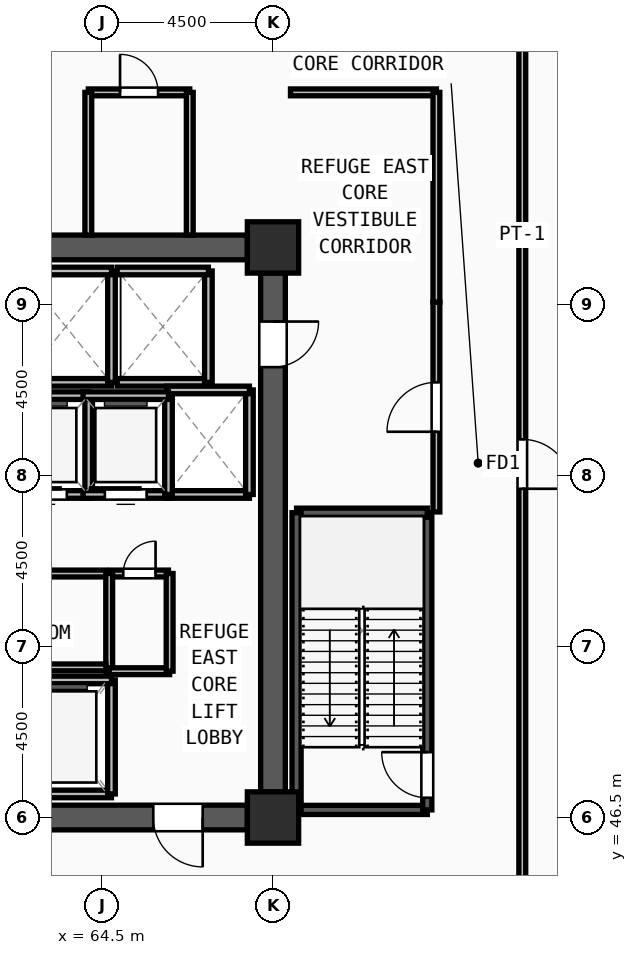
"""IFC4 building model, lengths in metres.
Left out: names, types, materials, properties, quantities, classifications, styles, units other than length and angle.
Written with IfcOpenShell. Run it as: python <this file> out.ifc"""

import sys

from ifc_helpers import new_model, si_unit, direction, frame, frame_2d, origin, origin_2d, place, context, subcontext, project, spatial, rectangle, extrude, source, transform, mapped, element, fill, save


model = new_model("IFC4")
c1 = context("Model", 3, precision=1e-05, world=origin(), true_north=direction((0.0, 1.0)))
c2 = subcontext(c1, "Body", "Model", "MODEL_VIEW")
j1 = project(units=[si_unit("LENGTHUNIT", "METRE"), si_unit("PLANEANGLEUNIT", "RADIAN")], contexts=[c1])
p1 = place(None, origin())
s1 = spatial("IfcSite", under=j1, at=p1, CompositionType="ELEMENT")
p2 = place(p1, origin())
s2 = spatial("IfcBuilding", under=s1, at=p2, CompositionType="ELEMENT")
p3 = place(p2, frame((0.0, 0.0, 277.5)))
s3 = spatial("IfcBuildingStorey", under=s2, at=p3, CompositionType="ELEMENT", Elevation=277.5)
m1 = source(origin(), c2, "Body", "SweptSolid", [
    extrude(rectangle(XDim=1.35, YDim=1.35, at=origin_2d()), origin(), (0.0, 0.0, 1.0), 4.5),
])
for number, where, z_axis, x_axis in (
    (1, (69.0, 46.5, 0.0), (0.0, 0.0, 1.0), (1.0, 0.0, 0.0)),
    (2, (69.0, 61.5, 0.0), (0.0, 0.0, 1.0), (1.0, 0.0, 0.0)),
):
    element("IfcColumn", number, at=place(p3, frame(where, z_axis=z_axis, x_axis=x_axis)), inside=s3, PredefinedType="COLUMN", context=c2, shape_type="MappedRepresentation", body=[
        mapped(m1, transform((0.0, 0.0, 0.0), x_axis=(1.0, 0.0, 0.0), y_axis=(0.0, 1.0, 0.0), z_axis=(0.0, 0.0, 1.0), scale=1.0)),
    ])
p4 = place(p3, frame((60.675, 61.5, 0.0), z_axis=(0.0, 0.0, 1.0), x_axis=(1.0, 0.0, 0.0)))
e3 = element("IfcWall", 3, at=p4, inside=s3, PredefinedType="SHEAR", context=c2, shape_type="SweptSolid", body=[
    extrude(rectangle(XDim=7.65, YDim=0.65, at=frame_2d((3.825, 0.0))), origin(), (0.0, 0.0, 1.0), 4.22),
])
p5 = place(p3, frame((69.0, 60.825, 0.0), z_axis=(0.0, 0.0, 1.0), x_axis=(0.0, -1.0, 0.0)))
e4 = element("IfcWall", 4, at=p5, inside=s3, PredefinedType="SHEAR", context=c2, shape_type="SweptSolid", body=[
    extrude(rectangle(XDim=13.65, YDim=0.65, at=frame_2d((6.825, 0.0))), origin(), (0.0, 0.0, 1.0), 4.22),
])
m2 = source(origin(), c2, "Body", "SweptSolid", [
    extrude(rectangle(XDim=1.2, YDim=2.2, at=frame_2d((0.6, 1.1))), frame((0.0, 0.335, 0.0), z_axis=(0.0, -1.0, 0.0), x_axis=(1.0, 0.0, 0.0)), (0.0, 0.0, 1.0), 0.67),
])
p6 = place(p5, frame((1.275, 0.0, 0.0)))
e5 = element("IfcOpeningElement", 5, at=p6, cuts=e4, PredefinedType="OPENING", context=c2, shape_type="MappedRepresentation", body=[
    mapped(m2, transform((0.0, 0.0, 0.0), x_axis=(1.0, 0.0, 0.0), y_axis=(0.0, 1.0, 0.0), z_axis=(0.0, 0.0, 1.0), scale=1.0)),
])
p7 = place(p3, frame((68.325, 46.5, 0.0), z_axis=(0.0, 0.0, 1.0), x_axis=(-1.0, 0.0, 0.0)))
e6 = element("IfcWall", 6, at=p7, inside=s3, PredefinedType="SHEAR", context=c2, shape_type="SweptSolid", body=[
    extrude(rectangle(XDim=7.65, YDim=0.65, at=frame_2d((3.825, 0.0))), origin(), (0.0, 0.0, 1.0), 4.22),
])
m3 = source(origin(), c2, "Body", "SweptSolid", [
    extrude(rectangle(XDim=1.3, YDim=2.2, at=frame_2d((0.65, 1.1))), frame((0.0, 0.335, 0.0), z_axis=(0.0, -1.0, 0.0), x_axis=(1.0, 0.0, 0.0)), (0.0, 0.0, 1.0), 0.67),
])
p8 = place(p7, frame((1.175, 0.0, 0.0)))
e7 = element("IfcOpeningElement", 7, at=p8, cuts=e6, PredefinedType="OPENING", context=c2, shape_type="MappedRepresentation", body=[
    mapped(m3, transform((0.0, 0.0, 0.0), x_axis=(1.0, 0.0, 0.0), y_axis=(0.0, 1.0, 0.0), z_axis=(0.0, 0.0, 1.0), scale=1.0)),
])
p9 = place(p3, frame((69.62, 46.7, 0.0), z_axis=(0.0, 0.0, 1.0), x_axis=(1.0, 0.0, 0.0)))
e8 = element("IfcWall", 8, at=p9, inside=s3, PredefinedType="SOLIDWALL", context=c2, shape_type="SweptSolid", body=[
    extrude(rectangle(XDim=3.44, YDim=0.24, at=frame_2d((1.72, 0.0))), origin(), (0.0, 0.0, 1.0), 4.22),
])
p10 = place(p3, frame((73.06, 46.7, 0.0), z_axis=(0.0, 0.0, 1.0), x_axis=(0.0, 1.0, 0.0)))
e9 = element("IfcWall", 9, at=p10, inside=s3, PredefinedType="SOLIDWALL", context=c2, shape_type="SweptSolid", body=[
    extrude(rectangle(XDim=7.82, YDim=0.24, at=frame_2d((3.91, 0.0))), origin(), (0.0, 0.0, 1.0), 4.22),
])
m4 = source(origin(), c2, "Body", "SweptSolid", [
    extrude(rectangle(XDim=1.2, YDim=2.2, at=frame_2d((0.6, 1.1))), frame((0.0, 0.13, 0.0), z_axis=(0.0, -1.0, 0.0), x_axis=(1.0, 0.0, 0.0)), (0.0, 0.0, 1.0), 0.26),
])
p11 = place(p10, frame((0.32, 0.0, 0.0)))
e10 = element("IfcOpeningElement", 10, at=p11, cuts=e9, PredefinedType="OPENING", context=c2, shape_type="MappedRepresentation", body=[
    mapped(m4, transform((0.0, 0.0, 0.0), x_axis=(1.0, 0.0, 0.0), y_axis=(0.0, 1.0, 0.0), z_axis=(0.0, 0.0, 1.0), scale=1.0)),
])
p12 = place(p3, frame((73.06, 54.52, 0.0), z_axis=(0.0, 0.0, 1.0), x_axis=(-1.0, 0.0, 0.0)))
e11 = element("IfcWall", 11, at=p12, inside=s3, PredefinedType="SOLIDWALL", context=c2, shape_type="SweptSolid", body=[
    extrude(rectangle(XDim=3.44, YDim=0.24, at=frame_2d((1.72, 0.0))), origin(), (0.0, 0.0, 1.0), 4.22),
])
p13 = place(p3, frame((69.62, 54.52, 0.0), z_axis=(0.0, 0.0, 1.0), x_axis=(0.0, -1.0, 0.0)))
e12 = element("IfcWall", 12, at=p13, inside=s3, PredefinedType="SOLIDWALL", context=c2, shape_type="SweptSolid", body=[
    extrude(rectangle(XDim=7.82, YDim=0.24, at=frame_2d((3.91, 0.0))), origin(), (0.0, 0.0, 1.0), 4.22),
])
p14 = place(p3, frame((62.35, 47.12, 0.0), z_axis=(0.0, 0.0, 1.0), x_axis=(1.0, 0.0, 0.0)))
e13 = element("IfcWall", 13, at=p14, inside=s3, PredefinedType="SOLIDWALL", context=c2, shape_type="SweptSolid", body=[
    extrude(rectangle(XDim=2.4, YDim=0.2, at=frame_2d((1.2, 0.0))), origin(), (0.0, 0.0, 1.0), 4.22),
])
p15 = place(p3, frame((64.75, 47.12, 0.0), z_axis=(0.0, 0.0, 1.0), x_axis=(0.0, 1.0, 0.0)))
e14 = element("IfcWall", 14, at=p15, inside=s3, PredefinedType="SOLIDWALL", context=c2, shape_type="SweptSolid", body=[
    extrude(rectangle(XDim=3.0, YDim=0.2, at=frame_2d((1.5, 0.0))), origin(), (0.0, 0.0, 1.0), 4.22),
])
for number, where, z_axis, x_axis in (
    (15, (64.75, 50.12, 0.0), (0.0, 0.0, 1.0), (-1.0, 0.0, 0.0)),
    (16, (62.35, 57.95, 0.0), (0.0, 0.0, 1.0), (1.0, 0.0, 0.0)),
):
    element("IfcWall", number, at=place(p3, frame(where, z_axis=z_axis, x_axis=x_axis)), inside=s3, PredefinedType="SOLIDWALL", context=c2, shape_type="SweptSolid", body=[
        extrude(rectangle(XDim=2.4, YDim=0.2, at=frame_2d((1.2, 0.0))), origin(), (0.0, 0.0, 1.0), 4.22),
    ])
p16 = place(p3, frame((64.75, 57.95, 0.0), z_axis=(0.0, 0.0, 1.0), x_axis=(0.0, 1.0, 0.0)))
e17 = element("IfcWall", 17, at=p16, inside=s3, PredefinedType="SOLIDWALL", context=c2, shape_type="SweptSolid", body=[
    extrude(rectangle(XDim=2.93, YDim=0.2, at=frame_2d((1.465, 0.0))), origin(), (0.0, 0.0, 1.0), 4.22),
])
p17 = place(p3, frame((64.75, 60.88, 0.0), z_axis=(0.0, 0.0, 1.0), x_axis=(-1.0, 0.0, 0.0)))
e18 = element("IfcWall", 18, at=p17, inside=s3, PredefinedType="SOLIDWALL", context=c2, shape_type="SweptSolid", body=[
    extrude(rectangle(XDim=2.4, YDim=0.2, at=frame_2d((1.2, 0.0))), origin(), (0.0, 0.0, 1.0), 4.22),
])
p18 = place(p3, frame((64.9, 57.95, 0.0), z_axis=(0.0, 0.0, 1.0), x_axis=(1.0, 0.0, 0.0)))
e19 = element("IfcWall", 19, at=p18, inside=s3, PredefinedType="SOLIDWALL", context=c2, shape_type="SweptSolid", body=[
    extrude(rectangle(XDim=2.4, YDim=0.2, at=frame_2d((1.2, 0.0))), origin(), (0.0, 0.0, 1.0), 4.22),
])
p19 = place(p3, frame((67.3, 57.95, 0.0), z_axis=(0.0, 0.0, 1.0), x_axis=(0.0, 1.0, 0.0)))
e20 = element("IfcWall", 20, at=p19, inside=s3, PredefinedType="SOLIDWALL", context=c2, shape_type="SweptSolid", body=[
    extrude(rectangle(XDim=2.93, YDim=0.2, at=frame_2d((1.465, 0.0))), origin(), (0.0, 0.0, 1.0), 4.22),
])
p20 = place(p3, frame((67.3, 60.88, 0.0), z_axis=(0.0, 0.0, 1.0), x_axis=(-1.0, 0.0, 0.0)))
e21 = element("IfcWall", 21, at=p20, inside=s3, PredefinedType="SOLIDWALL", context=c2, shape_type="SweptSolid", body=[
    extrude(rectangle(XDim=2.4, YDim=0.2, at=frame_2d((1.2, 0.0))), origin(), (0.0, 0.0, 1.0), 4.22),
])
p21 = place(p3, frame((66.2, 55.0, 0.0), z_axis=(0.0, 0.0, 1.0), x_axis=(1.0, 0.0, 0.0)))
e22 = element("IfcWall", 22, at=p21, inside=s3, PredefinedType="SOLIDWALL", context=c2, shape_type="SweptSolid", body=[
    extrude(rectangle(XDim=2.18, YDim=0.2, at=frame_2d((1.09, 0.0))), origin(), (0.0, 0.0, 1.0), 4.22),
])
p22 = place(p3, frame((68.38, 55.0, 0.0), z_axis=(0.0, 0.0, 1.0), x_axis=(0.0, 1.0, 0.0)))
e23 = element("IfcWall", 23, at=p22, inside=s3, PredefinedType="SOLIDWALL", context=c2, shape_type="SweptSolid", body=[
    extrude(rectangle(XDim=2.75, YDim=0.2, at=frame_2d((1.375, 0.0))), origin(), (0.0, 0.0, 1.0), 4.22),
])
p23 = place(p3, frame((68.38, 57.75, 0.0), z_axis=(0.0, 0.0, 1.0), x_axis=(-1.0, 0.0, 0.0)))
e24 = element("IfcWall", 24, at=p23, inside=s3, PredefinedType="SOLIDWALL", context=c2, shape_type="SweptSolid", body=[
    extrude(rectangle(XDim=2.18, YDim=0.2, at=frame_2d((1.09, 0.0))), origin(), (0.0, 0.0, 1.0), 4.22),
])
p24 = place(p3, frame((61.9, 55.0, 0.0), z_axis=(0.0, 0.0, 1.0), x_axis=(1.0, 0.0, 0.0)))
e25 = element("IfcWall", 25, at=p24, inside=s3, PredefinedType="SOLIDWALL", context=c2, shape_type="SweptSolid", body=[
    extrude(rectangle(XDim=2.25, YDim=0.2, at=frame_2d((1.125, 0.0))), origin(), (0.0, 0.0, 1.0), 4.22),
])
m5 = source(origin(), c2, "Body", "SweptSolid", [
    extrude(rectangle(XDim=1.1, YDim=2.2, at=frame_2d((0.55, 1.1))), frame((0.0, 0.11, 0.0), z_axis=(0.0, -1.0, 0.0), x_axis=(1.0, 0.0, 0.0)), (0.0, 0.0, 1.0), 0.22),
])
p25 = place(p24, frame((0.575, 0.0, 0.0)))
e26 = element("IfcOpeningElement", 26, at=p25, cuts=e25, PredefinedType="OPENING", context=c2, shape_type="MappedRepresentation", body=[
    mapped(m5, transform((0.0, 0.0, 0.0), x_axis=(1.0, 0.0, 0.0), y_axis=(0.0, 1.0, 0.0), z_axis=(0.0, 0.0, 1.0), scale=1.0)),
])
p26 = place(p3, frame((64.15, 55.0, 0.0), z_axis=(0.0, 0.0, 1.0), x_axis=(0.0, 1.0, 0.0)))
e27 = element("IfcWall", 27, at=p26, inside=s3, PredefinedType="SOLIDWALL", context=c2, shape_type="SweptSolid", body=[
    extrude(rectangle(XDim=2.6, YDim=0.2, at=frame_2d((1.3, 0.0))), origin(), (0.0, 0.0, 1.0), 4.22),
])
p27 = place(p3, frame((64.15, 57.6, 0.0), z_axis=(0.0, 0.0, 1.0), x_axis=(-1.0, 0.0, 0.0)))
e28 = element("IfcWall", 28, at=p27, inside=s3, PredefinedType="SOLIDWALL", context=c2, shape_type="SweptSolid", body=[
    extrude(rectangle(XDim=2.25, YDim=0.2, at=frame_2d((1.125, 0.0))), origin(), (0.0, 0.0, 1.0), 4.22),
])
p28 = place(p3, frame((64.0, 55.0, 0.0), z_axis=(0.0, 0.0, 1.0), x_axis=(1.0, 0.0, 0.0)))
e29 = element("IfcWall", 29, at=p28, inside=s3, PredefinedType="SOLIDWALL", context=c2, shape_type="SweptSolid", body=[
    extrude(rectangle(XDim=2.25, YDim=0.2, at=frame_2d((1.125, 0.0))), origin(), (0.0, 0.0, 1.0), 4.22),
])
p29 = place(p28, frame((0.575, 0.0, 0.0)))
e30 = element("IfcOpeningElement", 30, at=p29, cuts=e29, PredefinedType="OPENING", context=c2, shape_type="MappedRepresentation", body=[
    mapped(m5, transform((0.0, 0.0, 0.0), x_axis=(1.0, 0.0, 0.0), y_axis=(0.0, 1.0, 0.0), z_axis=(0.0, 0.0, 1.0), scale=1.0)),
])
p30 = place(p3, frame((66.25, 55.0, 0.0), z_axis=(0.0, 0.0, 1.0), x_axis=(0.0, 1.0, 0.0)))
e31 = element("IfcWall", 31, at=p30, inside=s3, PredefinedType="SOLIDWALL", context=c2, shape_type="SweptSolid", body=[
    extrude(rectangle(XDim=2.6, YDim=0.2, at=frame_2d((1.3, 0.0))), origin(), (0.0, 0.0, 1.0), 4.22),
])
p31 = place(p3, frame((66.25, 57.6, 0.0), z_axis=(0.0, 0.0, 1.0), x_axis=(-1.0, 0.0, 0.0)))
e32 = element("IfcWall", 32, at=p31, inside=s3, PredefinedType="SOLIDWALL", context=c2, shape_type="SweptSolid", body=[
    extrude(rectangle(XDim=2.25, YDim=0.2, at=frame_2d((1.125, 0.0))), origin(), (0.0, 0.0, 1.0), 4.22),
])
p32 = place(p3, frame((55.39, 52.92, 0.0), z_axis=(0.0, 0.0, 1.0), x_axis=(1.0, 0.0, 0.0)))
e33 = element("IfcWall", 33, at=p32, inside=s3, PredefinedType="PARTITIONING", context=c2, shape_type="SweptSolid", body=[
    extrude(rectangle(XDim=9.21, YDim=0.18, at=frame_2d((4.605, 0.0))), origin(), (0.0, 0.0, 1.0), 4.22),
])
m6 = source(origin(), c2, "Body", "SweptSolid", [
    extrude(rectangle(XDim=0.85, YDim=2.1, at=frame_2d((0.425, 1.05))), frame((0.0, 0.1, 0.0), z_axis=(0.0, -1.0, 0.0), x_axis=(1.0, 0.0, 0.0)), (0.0, 0.0, 1.0), 0.2),
])
p33 = place(p32, frame((4.185, 0.0, 0.0)))
e34 = element("IfcOpeningElement", 34, at=p33, cuts=e33, PredefinedType="OPENING", context=c2, shape_type="MappedRepresentation", body=[
    mapped(m6, transform((0.0, 0.0, 0.0), x_axis=(1.0, 0.0, 0.0), y_axis=(0.0, 1.0, 0.0), z_axis=(0.0, 0.0, 1.0), scale=1.0)),
])
p34 = place(p3, frame((64.72, 52.92, 0.0), z_axis=(0.0, 0.0, 1.0), x_axis=(1.0, 0.0, 0.0)))
e35 = element("IfcWall", 35, at=p34, inside=s3, PredefinedType="PARTITIONING", context=c2, shape_type="SweptSolid", body=[
    extrude(rectangle(XDim=1.53, YDim=0.18, at=frame_2d((0.765, 0.0))), origin(), (0.0, 0.0, 1.0), 4.22),
])
p35 = place(p34, frame((0.34, 0.0, 0.0)))
e36 = element("IfcOpeningElement", 36, at=p35, cuts=e35, PredefinedType="OPENING", context=c2, shape_type="MappedRepresentation", body=[
    mapped(m6, transform((0.0, 0.0, 0.0), x_axis=(1.0, 0.0, 0.0), y_axis=(0.0, 1.0, 0.0), z_axis=(0.0, 0.0, 1.0), scale=1.0)),
])
p36 = place(p3, frame((64.14, 65.58, 0.0), z_axis=(0.0, 0.0, 1.0), x_axis=(1.0, 0.0, 0.0)))
e37 = element("IfcWall", 37, at=p36, inside=s3, PredefinedType="PARTITIONING", context=c2, shape_type="SweptSolid", body=[
    extrude(rectangle(XDim=2.67, YDim=0.18, at=frame_2d((1.335, 0.0))), origin(), (0.0, 0.0, 1.0), 4.22),
])
m7 = source(origin(), c2, "Body", "SweptSolid", [
    extrude(rectangle(XDim=1.0, YDim=2.2, at=frame_2d((0.5, 1.1))), frame((0.0, 0.1, 0.0), z_axis=(0.0, -1.0, 0.0), x_axis=(1.0, 0.0, 0.0)), (0.0, 0.0, 1.0), 0.2),
])
p37 = place(p36, frame((0.835, 0.0, 0.0)))
e38 = element("IfcOpeningElement", 38, at=p37, cuts=e37, PredefinedType="OPENING", context=c2, shape_type="MappedRepresentation", body=[
    mapped(m7, transform((0.0, 0.0, 0.0), x_axis=(1.0, 0.0, 0.0), y_axis=(0.0, 1.0, 0.0), z_axis=(0.0, 0.0, 1.0), scale=1.0)),
])
p38 = place(p3, frame((73.3, 54.54, 0.0), z_axis=(0.0, 0.0, 1.0), x_axis=(0.0, 1.0, 0.0)))
e39 = element("IfcWall", 39, at=p38, inside=s3, PredefinedType="PARTITIONING", context=c2, shape_type="SweptSolid", body=[
    extrude(rectangle(XDim=5.52, YDim=0.18, at=frame_2d((2.76, 0.0))), origin(), (0.0, 0.0, 1.0), 4.22),
])
m8 = source(origin(), c2, "Body", "SweptSolid", [
    extrude(rectangle(XDim=1.3, YDim=2.2, at=frame_2d((0.65, 1.1))), frame((0.0, 0.1, 0.0), z_axis=(0.0, -1.0, 0.0), x_axis=(1.0, 0.0, 0.0)), (0.0, 0.0, 1.0), 0.2),
])
p39 = place(p38, frame((2.11, 0.0, 0.0)))
e40 = element("IfcOpeningElement", 40, at=p39, cuts=e39, PredefinedType="OPENING", context=c2, shape_type="MappedRepresentation", body=[
    mapped(m8, transform((0.0, 0.0, 0.0), x_axis=(1.0, 0.0, 0.0), y_axis=(0.0, 1.0, 0.0), z_axis=(0.0, 0.0, 1.0), scale=1.0)),
])
p40 = place(p3, frame((75.56, 67.015, 0.0), z_axis=(0.0, 0.0, 1.0), x_axis=(0.0, -1.0, 0.0)))
e41 = element("IfcWall", 41, at=p40, inside=s3, PredefinedType="PARTITIONING", context=c2, shape_type="SweptSolid", body=[
    extrude(rectangle(XDim=22.43, YDim=0.18, at=frame_2d((11.215, 0.0))), origin(), (0.0, 0.0, 1.0), 4.22),
])
p41 = place(p40, frame((10.565, 0.0, 0.0)))
e42 = element("IfcOpeningElement", 42, at=p41, cuts=e41, PredefinedType="OPENING", context=c2, shape_type="MappedRepresentation", body=[
    mapped(m8, transform((0.0, 0.0, 0.0), x_axis=(1.0, 0.0, 0.0), y_axis=(0.0, 1.0, 0.0), z_axis=(0.0, 0.0, 1.0), scale=1.0)),
])
p42 = place(p3, frame((64.69, 50.35, 0.0), z_axis=(0.0, 0.0, 1.0), x_axis=(0.0, 1.0, 0.0)))
e43 = element("IfcWall", 43, at=p42, inside=s3, PredefinedType="PARTITIONING", context=c2, shape_type="SweptSolid", body=[
    extrude(rectangle(XDim=2.57, YDim=0.18, at=frame_2d((1.285, 0.0))), origin(), (0.0, 0.0, 1.0), 4.22),
])
p43 = place(p3, frame((64.69, 50.35, 0.0), z_axis=(0.0, 0.0, 1.0), x_axis=(1.0, 0.0, 0.0)))
e44 = element("IfcWall", 44, at=p43, inside=s3, PredefinedType="PARTITIONING", context=c2, shape_type="SweptSolid", body=[
    extrude(rectangle(XDim=1.59, YDim=0.18, at=frame_2d((0.795, 0.0))), origin(), (0.0, 0.0, 1.0), 4.22),
])
p44 = place(p3, frame((66.28, 50.35, 0.0), z_axis=(0.0, 0.0, 1.0), x_axis=(0.0, 1.0, 0.0)))
e45 = element("IfcWall", 45, at=p44, inside=s3, PredefinedType="PARTITIONING", context=c2, shape_type="SweptSolid", body=[
    extrude(rectangle(XDim=2.57, YDim=0.18, at=frame_2d((1.285, 0.0))), origin(), (0.0, 0.0, 1.0), 4.22),
])
for number, where, z_axis, x_axis in (
    (46, (64.14, 61.825, 0.0), (0.0, 0.0, 1.0), (0.0, 1.0, 0.0)),
    (47, (66.81, 61.825, 0.0), (0.0, 0.0, 1.0), (0.0, 1.0, 0.0)),
):
    element("IfcWall", number, at=place(p3, frame(where, z_axis=z_axis, x_axis=x_axis)), inside=s3, PredefinedType="PARTITIONING", context=c2, shape_type="SweptSolid", body=[
        extrude(rectangle(XDim=3.755, YDim=0.18, at=frame_2d((1.877, 0.0))), origin(), (0.0, 0.0, 1.0), 4.22),
    ])
p45 = place(p3, frame((69.46, 65.58, 0.0), z_axis=(0.0, 0.0, 1.0), x_axis=(1.0, 0.0, 0.0)))
e48 = element("IfcWall", 48, at=p45, inside=s3, PredefinedType="PARTITIONING", context=c2, shape_type="SweptSolid", body=[
    extrude(rectangle(XDim=3.84, YDim=0.18, at=frame_2d((1.92, 0.0))), origin(), (0.0, 0.0, 1.0), 4.22),
])
p46 = place(p3, frame((73.3, 60.06, 0.0), z_axis=(0.0, 0.0, 1.0), x_axis=(0.0, 1.0, 0.0)))
e49 = element("IfcWall", 49, at=p46, inside=s3, PredefinedType="PARTITIONING", context=c2, shape_type="SweptSolid", body=[
    extrude(rectangle(XDim=5.52, YDim=0.18, at=frame_2d((2.76, 0.0))), origin(), (0.0, 0.0, 1.0), 4.22),
])
p47 = place(p3, frame((55.39, 50.45, 0.0), z_axis=(0.0, 0.0, 1.0), x_axis=(1.0, 0.0, 0.0)))
e50 = element("IfcWall", 50, at=p47, inside=s3, PredefinedType="PARTITIONING", context=c2, shape_type="SweptSolid", body=[
    extrude(rectangle(XDim=9.21, YDim=0.18, at=frame_2d((4.605, 0.0))), origin(), (0.0, 0.0, 1.0), 4.22),
])
m9 = source(origin(), c2, "Body", "SweptSolid", [
    extrude(rectangle(XDim=1.3, YDim=2.2, at=frame_2d((0.65, 1.1))), frame((0.0, 0.025, 0.0), z_axis=(0.0, -1.0, 0.0), x_axis=(1.0, 0.0, 0.0)), (0.0, 0.0, 1.0), 0.05),
])
p48 = place(p8, origin())
e51 = element("IfcDoor", 51, at=p48, inside=s3, OperationType="SINGLE_SWING_LEFT", PredefinedType="DOOR", context=c2, shape_type="MappedRepresentation", body=[
    mapped(m9, transform((0.0, 0.0, 0.0), x_axis=(1.0, 0.0, 0.0), y_axis=(0.0, 1.0, 0.0), z_axis=(0.0, 0.0, 1.0), scale=1.0)),
])
fill(e7, e51)
m10 = source(origin(), c2, "Body", "SweptSolid", [
    extrude(rectangle(XDim=1.2, YDim=2.2, at=frame_2d((0.6, 1.1))), frame((0.0, 0.025, 0.0), z_axis=(0.0, -1.0, 0.0), x_axis=(1.0, 0.0, 0.0)), (0.0, 0.0, 1.0), 0.05),
])
p49 = place(p6, origin())
e52 = element("IfcDoor", 52, at=p49, inside=s3, OperationType="SINGLE_SWING_LEFT", PredefinedType="DOOR", context=c2, shape_type="MappedRepresentation", body=[
    mapped(m10, transform((0.0, 0.0, 0.0), x_axis=(1.0, 0.0, 0.0), y_axis=(0.0, 1.0, 0.0), z_axis=(0.0, 0.0, 1.0), scale=1.0)),
])
fill(e5, e52)
p50 = place(p11, origin())
e53 = element("IfcDoor", 53, at=p50, inside=s3, OperationType="SINGLE_SWING_RIGHT", PredefinedType="DOOR", context=c2, shape_type="MappedRepresentation", body=[
    mapped(m10, transform((0.0, 0.0, 0.0), x_axis=(1.0, 0.0, 0.0), y_axis=(0.0, 1.0, 0.0), z_axis=(0.0, 0.0, 1.0), scale=1.0)),
])
fill(e10, e53)
m11 = source(origin(), c2, "Body", "SweptSolid", [
    extrude(rectangle(XDim=1.1, YDim=2.2, at=frame_2d((0.55, 1.1))), frame((0.0, 0.025, 0.0), z_axis=(0.0, -1.0, 0.0), x_axis=(1.0, 0.0, 0.0)), (0.0, 0.0, 1.0), 0.05),
])
p51 = place(p25, origin())
e54 = element("IfcDoor", 54, at=p51, inside=s3, OperationType="SLIDING_TO_LEFT", PredefinedType="DOOR", context=c2, shape_type="MappedRepresentation", body=[
    mapped(m11, transform((0.0, 0.0, 0.0), x_axis=(1.0, 0.0, 0.0), y_axis=(0.0, 1.0, 0.0), z_axis=(0.0, 0.0, 1.0), scale=1.0)),
])
fill(e26, e54)
p52 = place(p29, origin())
e55 = element("IfcDoor", 55, at=p52, inside=s3, OperationType="SLIDING_TO_LEFT", PredefinedType="DOOR", context=c2, shape_type="MappedRepresentation", body=[
    mapped(m11, transform((0.0, 0.0, 0.0), x_axis=(1.0, 0.0, 0.0), y_axis=(0.0, 1.0, 0.0), z_axis=(0.0, 0.0, 1.0), scale=1.0)),
])
fill(e30, e55)
m12 = source(origin(), c2, "Body", "SweptSolid", [
    extrude(rectangle(XDim=0.85, YDim=2.1, at=frame_2d((0.425, 1.05))), frame((0.0, 0.025, 0.0), z_axis=(0.0, -1.0, 0.0), x_axis=(1.0, 0.0, 0.0)), (0.0, 0.0, 1.0), 0.05),
])
p53 = place(p35, origin())
e56 = element("IfcDoor", 56, at=p53, inside=s3, OperationType="SINGLE_SWING_RIGHT", PredefinedType="DOOR", context=c2, shape_type="MappedRepresentation", body=[
    mapped(m12, transform((0.0, 0.0, 0.0), x_axis=(1.0, 0.0, 0.0), y_axis=(0.0, 1.0, 0.0), z_axis=(0.0, 0.0, 1.0), scale=1.0)),
])
fill(e36, e56)
m13 = source(origin(), c2, "Body", "SweptSolid", [
    extrude(rectangle(XDim=1.0, YDim=2.2, at=frame_2d((0.5, 1.1))), frame((0.0, 0.025, 0.0), z_axis=(0.0, -1.0, 0.0), x_axis=(1.0, 0.0, 0.0)), (0.0, 0.0, 1.0), 0.05),
])
p54 = place(p37, origin())
e57 = element("IfcDoor", 57, at=p54, inside=s3, OperationType="SINGLE_SWING_LEFT", PredefinedType="DOOR", context=c2, shape_type="MappedRepresentation", body=[
    mapped(m13, transform((0.0, 0.0, 0.0), x_axis=(1.0, 0.0, 0.0), y_axis=(0.0, 1.0, 0.0), z_axis=(0.0, 0.0, 1.0), scale=1.0)),
])
fill(e38, e57)
p55 = place(p39, origin())
e58 = element("IfcDoor", 58, at=p55, inside=s3, OperationType="SINGLE_SWING_LEFT", PredefinedType="DOOR", context=c2, shape_type="MappedRepresentation", body=[
    mapped(m9, transform((0.0, 0.0, 0.0), x_axis=(1.0, 0.0, 0.0), y_axis=(0.0, 1.0, 0.0), z_axis=(0.0, 0.0, 1.0), scale=1.0)),
])
fill(e40, e58)
p56 = place(p41, origin())
e59 = element("IfcDoor", 59, at=p56, inside=s3, OperationType="SINGLE_SWING_RIGHT", PredefinedType="DOOR", context=c2, shape_type="MappedRepresentation", body=[
    mapped(m9, transform((0.0, 0.0, 0.0), x_axis=(1.0, 0.0, 0.0), y_axis=(0.0, 1.0, 0.0), z_axis=(0.0, 0.0, 1.0), scale=1.0)),
])
fill(e42, e59)
save(model, sys.argv[1])
